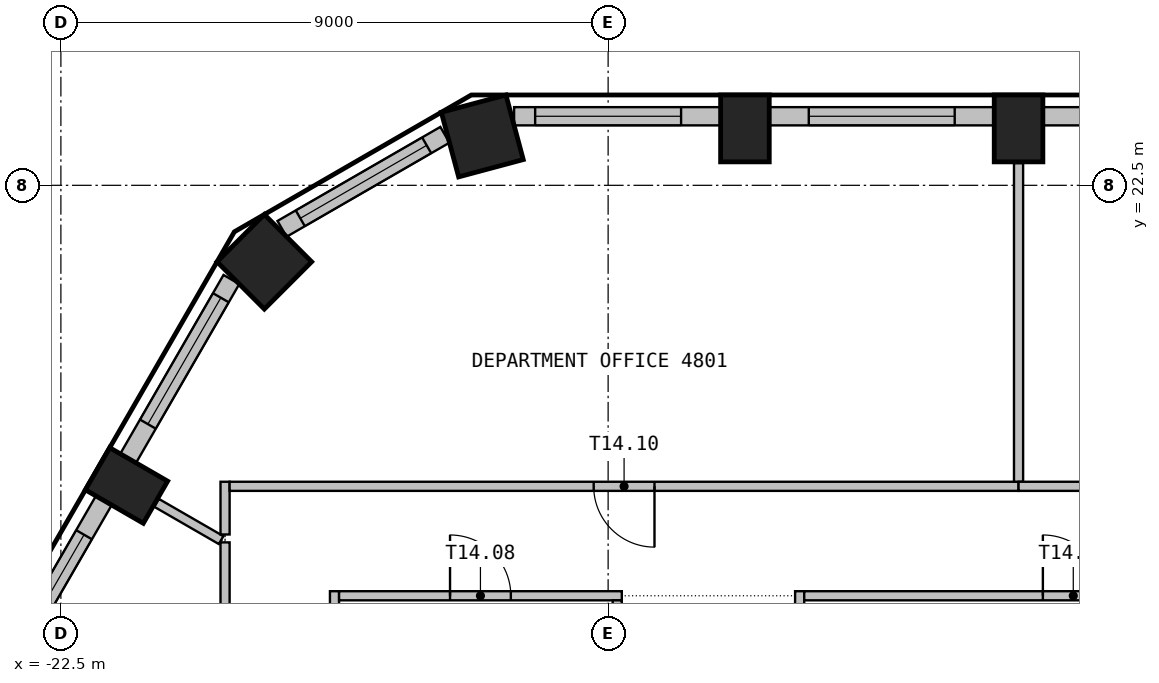
"""IFC4 building model, lengths in metres.
Left out: names, types, materials, properties, quantities, classifications, styles, units other than length and angle.
Written with IfcOpenShell. Run it as: python <this file> out.ifc"""

import sys

from ifc_helpers import new_model, si_unit, direction, frame, frame_2d, origin, origin_2d, place, context, subcontext, project, spatial, rectangle, extrude, element, fill, save


model = new_model("IFC4")
c1 = context("Model", 3, precision=1e-05, world=origin(), true_north=direction((0.0, 1.0)))
c2 = subcontext(c1, "Body", "Model", "MODEL_VIEW")
j1 = project(units=[si_unit("LENGTHUNIT", "METRE"), si_unit("PLANEANGLEUNIT", "RADIAN")], contexts=[c1])
p1 = place(None, origin())
s1 = spatial("IfcSite", under=j1, at=p1, CompositionType="ELEMENT")
p2 = place(p1, origin())
s2 = spatial("IfcBuilding", under=s1, at=p2, CompositionType="ELEMENT")
p3 = place(p2, frame((0.0, 0.0, 195.6)))
s3 = spatial("IfcBuildingStorey", under=s2, at=p3, CompositionType="ELEMENT", Elevation=195.6)
for number, where, z_axis, x_axis in (
    (1, (-6.75, 23.436, 0.0), (0.0, 0.0, 1.0), (-1.0, 0.0, 0.0)),
    (2, (-11.25, 23.436, 0.0), (0.0, 0.0, 1.0), (-1.0, 0.0, 0.0)),
):
    element("IfcColumn", number, at=place(p3, frame(where, z_axis=z_axis, x_axis=x_axis)), inside=s3, PredefinedType="COLUMN", context=c2, shape_type="SweptSolid", body=[
        extrude(rectangle(XDim=0.8, YDim=1.1, at=origin_2d()), origin(), (0.0, 0.0, 1.0), 3.55),
    ])
for number, where, z_axis, x_axis in (
    (3, (-15.57, 23.312, 0.0), (0.0, 0.0, 1.0), (-0.966, -0.259, 0.0)),
    (4, (-19.154, 21.242, 0.0), (0.0, 0.0, 1.0), (-0.707, -0.707, 0.0)),
):
    element("IfcColumn", number, at=place(p3, frame(where, z_axis=z_axis, x_axis=x_axis)), inside=s3, PredefinedType="COLUMN", context=c2, shape_type="SweptSolid", body=[
        extrude(rectangle(XDim=1.1, YDim=1.1, at=origin_2d()), origin(), (0.0, 0.0, 1.0), 3.55),
    ])
p4 = place(p3, frame((-21.421, 17.563, 0.0), z_axis=(0.0, 0.0, 1.0), x_axis=(-0.5, -0.866025403784, 0.0)))
e5 = element("IfcColumn", 5, at=p4, inside=s3, PredefinedType="COLUMN", context=c2, shape_type="SweptSolid", body=[
    extrude(rectangle(XDim=0.8, YDim=1.1, at=origin_2d()), origin(), (0.0, 0.0, 1.0), 3.55),
])
p5 = place(p3, frame((-2.65, 23.635, 0.0), z_axis=(0.0, 0.0, 1.0), x_axis=(-1.0, 0.0, 0.0)))
e6 = element("IfcWall", 6, at=p5, inside=s3, PredefinedType="SOLIDWALL", context=c2, shape_type="SweptSolid", body=[
    extrude(rectangle(XDim=3.699, YDim=0.3, at=frame_2d((1.85, 0.0))), origin(), (0.0, 0.0, 1.0), 3.55),
])
p6 = place(p5, frame((0.649, 0.0, 0.9)))
e7 = element("IfcOpeningElement", 7, at=p6, cuts=e6, PredefinedType="OPENING", context=c2, shape_type="SweptSolid", body=[
    extrude(rectangle(XDim=2.4, YDim=2.1, at=frame_2d((1.2, 1.05))), frame((0.0, 0.16, 0.0), z_axis=(0.0, -1.0, 0.0), x_axis=(1.0, 0.0, 0.0)), (0.0, 0.0, 1.0), 0.32),
])
p7 = place(p3, frame((-7.15, 23.635, 0.0), z_axis=(0.0, 0.0, 1.0), x_axis=(-1.0, 0.0, 0.0)))
e8 = element("IfcWall", 8, at=p7, inside=s3, PredefinedType="SOLIDWALL", context=c2, shape_type="SweptSolid", body=[
    extrude(rectangle(XDim=3.699, YDim=0.3, at=frame_2d((1.85, 0.0))), origin(), (0.0, 0.0, 1.0), 3.55),
])
p8 = place(p7, frame((0.649, 0.0, 0.9)))
e9 = element("IfcOpeningElement", 9, at=p8, cuts=e8, PredefinedType="OPENING", context=c2, shape_type="SweptSolid", body=[
    extrude(rectangle(XDim=2.4, YDim=2.1, at=frame_2d((1.2, 1.05))), frame((0.0, 0.16, 0.0), z_axis=(0.0, -1.0, 0.0), x_axis=(1.0, 0.0, 0.0)), (0.0, 0.0, 1.0), 0.32),
])
p9 = place(p3, frame((-11.65, 23.635, 0.0), z_axis=(0.0, 0.0, 1.0), x_axis=(-1.0, 0.0, 0.0)))
e10 = element("IfcWall", 10, at=p9, inside=s3, PredefinedType="SOLIDWALL", context=c2, shape_type="SweptSolid", body=[
    extrude(rectangle(XDim=3.396, YDim=0.3, at=frame_2d((1.698, 0.0))), origin(), (0.0, 0.0, 1.0), 3.55),
])
p10 = place(p9, frame((0.649, 0.0, 0.9)))
e11 = element("IfcOpeningElement", 11, at=p10, cuts=e10, PredefinedType="OPENING", context=c2, shape_type="SweptSolid", body=[
    extrude(rectangle(XDim=2.4, YDim=2.1, at=frame_2d((1.2, 1.05))), frame((0.0, 0.16, 0.0), z_axis=(0.0, -1.0, 0.0), x_axis=(1.0, 0.0, 0.0)), (0.0, 0.0, 1.0), 0.32),
])
p11 = place(p3, frame((-16.184, 23.331, 0.0), z_axis=(0.0, 0.0, 1.0), x_axis=(-0.865994975416, -0.500052699777, 0.0)))
e12 = element("IfcWall", 12, at=p11, inside=s3, PredefinedType="SOLIDWALL", context=c2, shape_type="SweptSolid", body=[
    extrude(rectangle(XDim=3.093, YDim=0.3, at=frame_2d((1.546, 0.0))), origin(), (0.0, 0.0, 1.0), 3.55),
])
p12 = place(p11, frame((0.346, 0.0, 0.9)))
e13 = element("IfcOpeningElement", 13, at=p12, cuts=e12, PredefinedType="OPENING", context=c2, shape_type="SweptSolid", body=[
    extrude(rectangle(XDim=2.4, YDim=2.1, at=frame_2d((1.2, 1.05))), frame((0.0, 0.16, 0.0), z_axis=(0.0, -1.0, 0.0), x_axis=(1.0, 0.0, 0.0)), (0.0, 0.0, 1.0), 0.32),
])
p13 = place(p3, frame((-19.696, 20.951, 0.0), z_axis=(0.0, 0.0, 1.0), x_axis=(-0.500012868213, -0.866017974191, 0.0)))
e14 = element("IfcWall", 14, at=p13, inside=s3, PredefinedType="SOLIDWALL", context=c2, shape_type="SweptSolid", body=[
    extrude(rectangle(XDim=3.396, YDim=0.3, at=frame_2d((1.698, 0.0))), origin(), (0.0, 0.0, 1.0), 3.55),
])
p14 = place(p13, frame((0.346, 0.0, 0.9)))
e15 = element("IfcOpeningElement", 15, at=p14, cuts=e14, PredefinedType="OPENING", context=c2, shape_type="SweptSolid", body=[
    extrude(rectangle(XDim=2.4, YDim=2.1, at=frame_2d((1.2, 1.05))), frame((0.0, 0.16, 0.0), z_axis=(0.0, -1.0, 0.0), x_axis=(1.0, 0.0, 0.0)), (0.0, 0.0, 1.0), 0.32),
])
p15 = place(p3, frame((-21.794, 17.317, 0.0), z_axis=(0.0, 0.0, 1.0), x_axis=(-0.500029062817, -0.866008623709, 0.0)))
e16 = element("IfcWall", 16, at=p15, inside=s3, PredefinedType="SOLIDWALL", context=c2, shape_type="SweptSolid", body=[
    extrude(rectangle(XDim=3.699, YDim=0.3, at=frame_2d((1.85, 0.0))), origin(), (0.0, 0.0, 1.0), 3.55),
])
p16 = place(p15, frame((0.649, 0.0, 0.9)))
e17 = element("IfcOpeningElement", 17, at=p16, cuts=e16, PredefinedType="OPENING", context=c2, shape_type="SweptSolid", body=[
    extrude(rectangle(XDim=2.4, YDim=2.1, at=frame_2d((1.2, 1.05))), frame((0.0, 0.16, 0.0), z_axis=(0.0, -1.0, 0.0), x_axis=(1.0, 0.0, 0.0)), (0.0, 0.0, 1.0), 0.32),
])
p17 = place(p3, frame((-20.927, 17.278, 0.0), z_axis=(0.0, 0.0, 1.0), x_axis=(0.866202157257, -0.499693728962, 0.0)))
e18 = element("IfcWall", 18, at=p17, inside=s3, PredefinedType="PARTITIONING", context=c2, shape_type="SweptSolid", body=[
    extrude(rectangle(XDim=1.226, YDim=0.15, at=frame_2d((0.613, 0.0))), origin(), (0.0, 0.0, 1.0), 3.55),
])
p18 = place(p3, frame((-19.8, 16.628, 0.0), z_axis=(0.0, 0.0, 1.0), x_axis=(0.0, -1.0, 0.0)))
e19 = element("IfcWall", 19, at=p18, inside=s3, PredefinedType="PARTITIONING", context=c2, shape_type="SweptSolid", body=[
    extrude(rectangle(XDim=15.589, YDim=0.15, at=frame_2d((7.794, 0.0))), origin(), (0.0, 0.0, 1.0), 3.55),
])
p19 = place(p18, frame((7.294, 0.0, 0.0)))
e20 = element("IfcOpeningElement", 20, at=p19, cuts=e19, PredefinedType="OPENING", context=c2, shape_type="SweptSolid", body=[
    extrude(rectangle(XDim=1.0, YDim=2.1, at=frame_2d((0.5, 1.05))), frame((0.0, 0.085, 0.0), z_axis=(0.0, -1.0, 0.0), x_axis=(1.0, 0.0, 0.0)), (0.0, 0.0, 1.0), 0.17),
])
p20 = place(p3, frame((-19.8, 17.625, 0.0), z_axis=(0.0, 0.0, 1.0), x_axis=(0.0, -1.0, 0.0)))
e21 = element("IfcWall", 21, at=p20, inside=s3, PredefinedType="PARTITIONING", context=c2, shape_type="SweptSolid", body=[
    extrude(rectangle(XDim=0.867, YDim=0.15, at=frame_2d((0.434, 0.0))), origin(), (0.0, 0.0, 1.0), 3.55),
])
p21 = place(p3, frame((-6.75, 17.55, 0.0), z_axis=(0.0, 0.0, 1.0), x_axis=(-1.0, 0.0, 0.0)))
e22 = element("IfcWall", 22, at=p21, inside=s3, PredefinedType="PARTITIONING", context=c2, shape_type="SweptSolid", body=[
    extrude(rectangle(XDim=12.975, YDim=0.15, at=frame_2d((6.488, 0.0))), origin(), (0.0, 0.0, 1.0), 3.55),
])
p22 = place(p21, frame((5.988, 0.0, 0.0)))
e23 = element("IfcOpeningElement", 23, at=p22, cuts=e22, PredefinedType="OPENING", context=c2, shape_type="SweptSolid", body=[
    extrude(rectangle(XDim=1.0, YDim=2.1, at=frame_2d((0.5, 1.05))), frame((0.0, 0.085, 0.0), z_axis=(0.0, -1.0, 0.0), x_axis=(1.0, 0.0, 0.0)), (0.0, 0.0, 1.0), 0.17),
])
p23 = place(p3, frame((-18.0, 11.25, 0.0), z_axis=(0.0, 0.0, 1.0), x_axis=(0.0, 1.0, 0.0)))
e24 = element("IfcWall", 24, at=p23, inside=s3, PredefinedType="PARTITIONING", context=c2, shape_type="SweptSolid", body=[
    extrude(rectangle(XDim=4.575, YDim=0.15, at=frame_2d((2.288, 0.0))), origin(), (0.0, 0.0, 1.0), 3.55),
])
p24 = place(p3, frame((-17.925, 15.75, 0.0), z_axis=(0.0, 0.0, 1.0), x_axis=(1.0, 0.0, 0.0)))
e25 = element("IfcWall", 25, at=p24, inside=s3, PredefinedType="PARTITIONING", context=c2, shape_type="SweptSolid", body=[
    extrude(rectangle(XDim=4.65, YDim=0.15, at=frame_2d((2.325, 0.0))), origin(), (0.0, 0.0, 1.0), 3.55),
])
p25 = place(p24, frame((1.825, 0.0, 0.0)))
e26 = element("IfcOpeningElement", 26, at=p25, cuts=e25, PredefinedType="OPENING", context=c2, shape_type="SweptSolid", body=[
    extrude(rectangle(XDim=1.0, YDim=2.1, at=frame_2d((0.5, 1.05))), frame((0.0, 0.085, 0.0), z_axis=(0.0, -1.0, 0.0), x_axis=(1.0, 0.0, 0.0)), (0.0, 0.0, 1.0), 0.17),
])
p26 = place(p3, frame((-13.35, 15.675, 0.0), z_axis=(0.0, 0.0, 1.0), x_axis=(0.0, -1.0, 0.0)))
e27 = element("IfcWall", 27, at=p26, inside=s3, PredefinedType="PARTITIONING", context=c2, shape_type="SweptSolid", body=[
    extrude(rectangle(XDim=4.425, YDim=0.15, at=frame_2d((2.212, 0.0))), origin(), (0.0, 0.0, 1.0), 3.55),
])
p27 = place(p3, frame((-10.35, 11.25, 0.0), z_axis=(0.0, 0.0, 1.0), x_axis=(0.0, 1.0, 0.0)))
e28 = element("IfcWall", 28, at=p27, inside=s3, PredefinedType="PARTITIONING", context=c2, shape_type="SweptSolid", body=[
    extrude(rectangle(XDim=4.575, YDim=0.15, at=frame_2d((2.288, 0.0))), origin(), (0.0, 0.0, 1.0), 3.55),
])
p28 = place(p3, frame((-10.275, 15.75, 0.0), z_axis=(0.0, 0.0, 1.0), x_axis=(1.0, 0.0, 0.0)))
e29 = element("IfcWall", 29, at=p28, inside=s3, PredefinedType="PARTITIONING", context=c2, shape_type="SweptSolid", body=[
    extrude(rectangle(XDim=8.85, YDim=0.15, at=frame_2d((4.425, 0.0))), origin(), (0.0, 0.0, 1.0), 3.55),
])
p29 = place(p28, frame((3.925, 0.0, 0.0)))
e30 = element("IfcOpeningElement", 30, at=p29, cuts=e29, PredefinedType="OPENING", context=c2, shape_type="SweptSolid", body=[
    extrude(rectangle(XDim=1.0, YDim=2.1, at=frame_2d((0.5, 1.05))), frame((0.0, 0.085, 0.0), z_axis=(0.0, -1.0, 0.0), x_axis=(1.0, 0.0, 0.0)), (0.0, 0.0, 1.0), 0.17),
])
p30 = place(p3, frame((-6.75, 22.865, 0.0), z_axis=(0.0, 0.0, 1.0), x_axis=(0.0, -1.0, 0.0)))
e31 = element("IfcWall", 31, at=p30, inside=s3, PredefinedType="PARTITIONING", context=c2, shape_type="SweptSolid", body=[
    extrude(rectangle(XDim=5.24, YDim=0.15, at=frame_2d((2.62, 0.0))), origin(), (0.0, 0.0, 1.0), 3.55),
])
p31 = place(p3, frame((11.25, 17.55, 0.0), z_axis=(0.0, 0.0, 1.0), x_axis=(-1.0, 0.0, 0.0)))
e32 = element("IfcWall", 32, at=p31, inside=s3, PredefinedType="PARTITIONING", context=c2, shape_type="SweptSolid", body=[
    extrude(rectangle(XDim=18.0, YDim=0.15, at=frame_2d((9.0, 0.0))), origin(), (0.0, 0.0, 1.0), 3.55),
])
p32 = place(p31, frame((8.5, 0.0, 0.0)))
e33 = element("IfcOpeningElement", 33, at=p32, cuts=e32, PredefinedType="OPENING", context=c2, shape_type="SweptSolid", body=[
    extrude(rectangle(XDim=1.0, YDim=2.1, at=frame_2d((0.5, 1.05))), frame((0.0, 0.085, 0.0), z_axis=(0.0, -1.0, 0.0), x_axis=(1.0, 0.0, 0.0)), (0.0, 0.0, 1.0), 0.17),
])
p33 = place(p8, origin())
e34 = element("IfcWindow", 34, at=p33, inside=s3, PartitioningType="SINGLE_PANEL", PredefinedType="WINDOW", context=c2, shape_type="SweptSolid", body=[
    extrude(rectangle(XDim=2.4, YDim=2.1, at=frame_2d((1.2, 1.05))), frame((0.0, 0.03, 0.0), z_axis=(0.0, -1.0, 0.0), x_axis=(1.0, 0.0, 0.0)), (0.0, 0.0, 1.0), 0.06),
])
fill(e9, e34)
p34 = place(p10, origin())
e35 = element("IfcWindow", 35, at=p34, inside=s3, PartitioningType="SINGLE_PANEL", PredefinedType="WINDOW", context=c2, shape_type="SweptSolid", body=[
    extrude(rectangle(XDim=2.4, YDim=2.1, at=frame_2d((1.2, 1.05))), frame((0.0, 0.03, 0.0), z_axis=(0.0, -1.0, 0.0), x_axis=(1.0, 0.0, 0.0)), (0.0, 0.0, 1.0), 0.06),
])
fill(e11, e35)
p35 = place(p12, origin())
e36 = element("IfcWindow", 36, at=p35, inside=s3, PartitioningType="SINGLE_PANEL", PredefinedType="WINDOW", context=c2, shape_type="SweptSolid", body=[
    extrude(rectangle(XDim=2.4, YDim=2.1, at=frame_2d((1.2, 1.05))), frame((0.0, 0.03, 0.0), z_axis=(0.0, -1.0, 0.0), x_axis=(1.0, 0.0, 0.0)), (0.0, 0.0, 1.0), 0.06),
])
fill(e13, e36)
p36 = place(p14, origin())
e37 = element("IfcWindow", 37, at=p36, inside=s3, PartitioningType="SINGLE_PANEL", PredefinedType="WINDOW", context=c2, shape_type="SweptSolid", body=[
    extrude(rectangle(XDim=2.4, YDim=2.1, at=frame_2d((1.2, 1.05))), frame((0.0, 0.03, 0.0), z_axis=(0.0, -1.0, 0.0), x_axis=(1.0, 0.0, 0.0)), (0.0, 0.0, 1.0), 0.06),
])
fill(e15, e37)
p37 = place(p16, origin())
e38 = element("IfcWindow", 38, at=p37, inside=s3, PartitioningType="SINGLE_PANEL", PredefinedType="WINDOW", context=c2, shape_type="SweptSolid", body=[
    extrude(rectangle(XDim=2.4, YDim=2.1, at=frame_2d((1.2, 1.05))), frame((0.0, 0.03, 0.0), z_axis=(0.0, -1.0, 0.0), x_axis=(1.0, 0.0, 0.0)), (0.0, 0.0, 1.0), 0.06),
])
fill(e17, e38)
p38 = place(p25, origin())
e39 = element("IfcDoor", 39, at=p38, inside=s3, OperationType="SINGLE_SWING_LEFT", PredefinedType="DOOR", context=c2, shape_type="SweptSolid", body=[
    extrude(rectangle(XDim=1.0, YDim=2.1, at=frame_2d((0.5, 1.05))), frame((0.0, 0.025, 0.0), z_axis=(0.0, -1.0, 0.0), x_axis=(1.0, 0.0, 0.0)), (0.0, 0.0, 1.0), 0.05),
])
fill(e26, e39)
p39 = place(p22, origin())
e40 = element("IfcDoor", 40, at=p39, inside=s3, OperationType="SINGLE_SWING_LEFT", PredefinedType="DOOR", context=c2, shape_type="SweptSolid", body=[
    extrude(rectangle(XDim=1.0, YDim=2.1, at=frame_2d((0.5, 1.05))), frame((0.0, 0.025, 0.0), z_axis=(0.0, -1.0, 0.0), x_axis=(1.0, 0.0, 0.0)), (0.0, 0.0, 1.0), 0.05),
])
fill(e23, e40)
p40 = place(p29, origin())
e41 = element("IfcDoor", 41, at=p40, inside=s3, OperationType="SINGLE_SWING_RIGHT", PredefinedType="DOOR", context=c2, shape_type="SweptSolid", body=[
    extrude(rectangle(XDim=1.0, YDim=2.1, at=frame_2d((0.5, 1.05))), frame((0.0, 0.025, 0.0), z_axis=(0.0, -1.0, 0.0), x_axis=(1.0, 0.0, 0.0)), (0.0, 0.0, 1.0), 0.05),
])
fill(e30, e41)
save(model, sys.argv[1])
